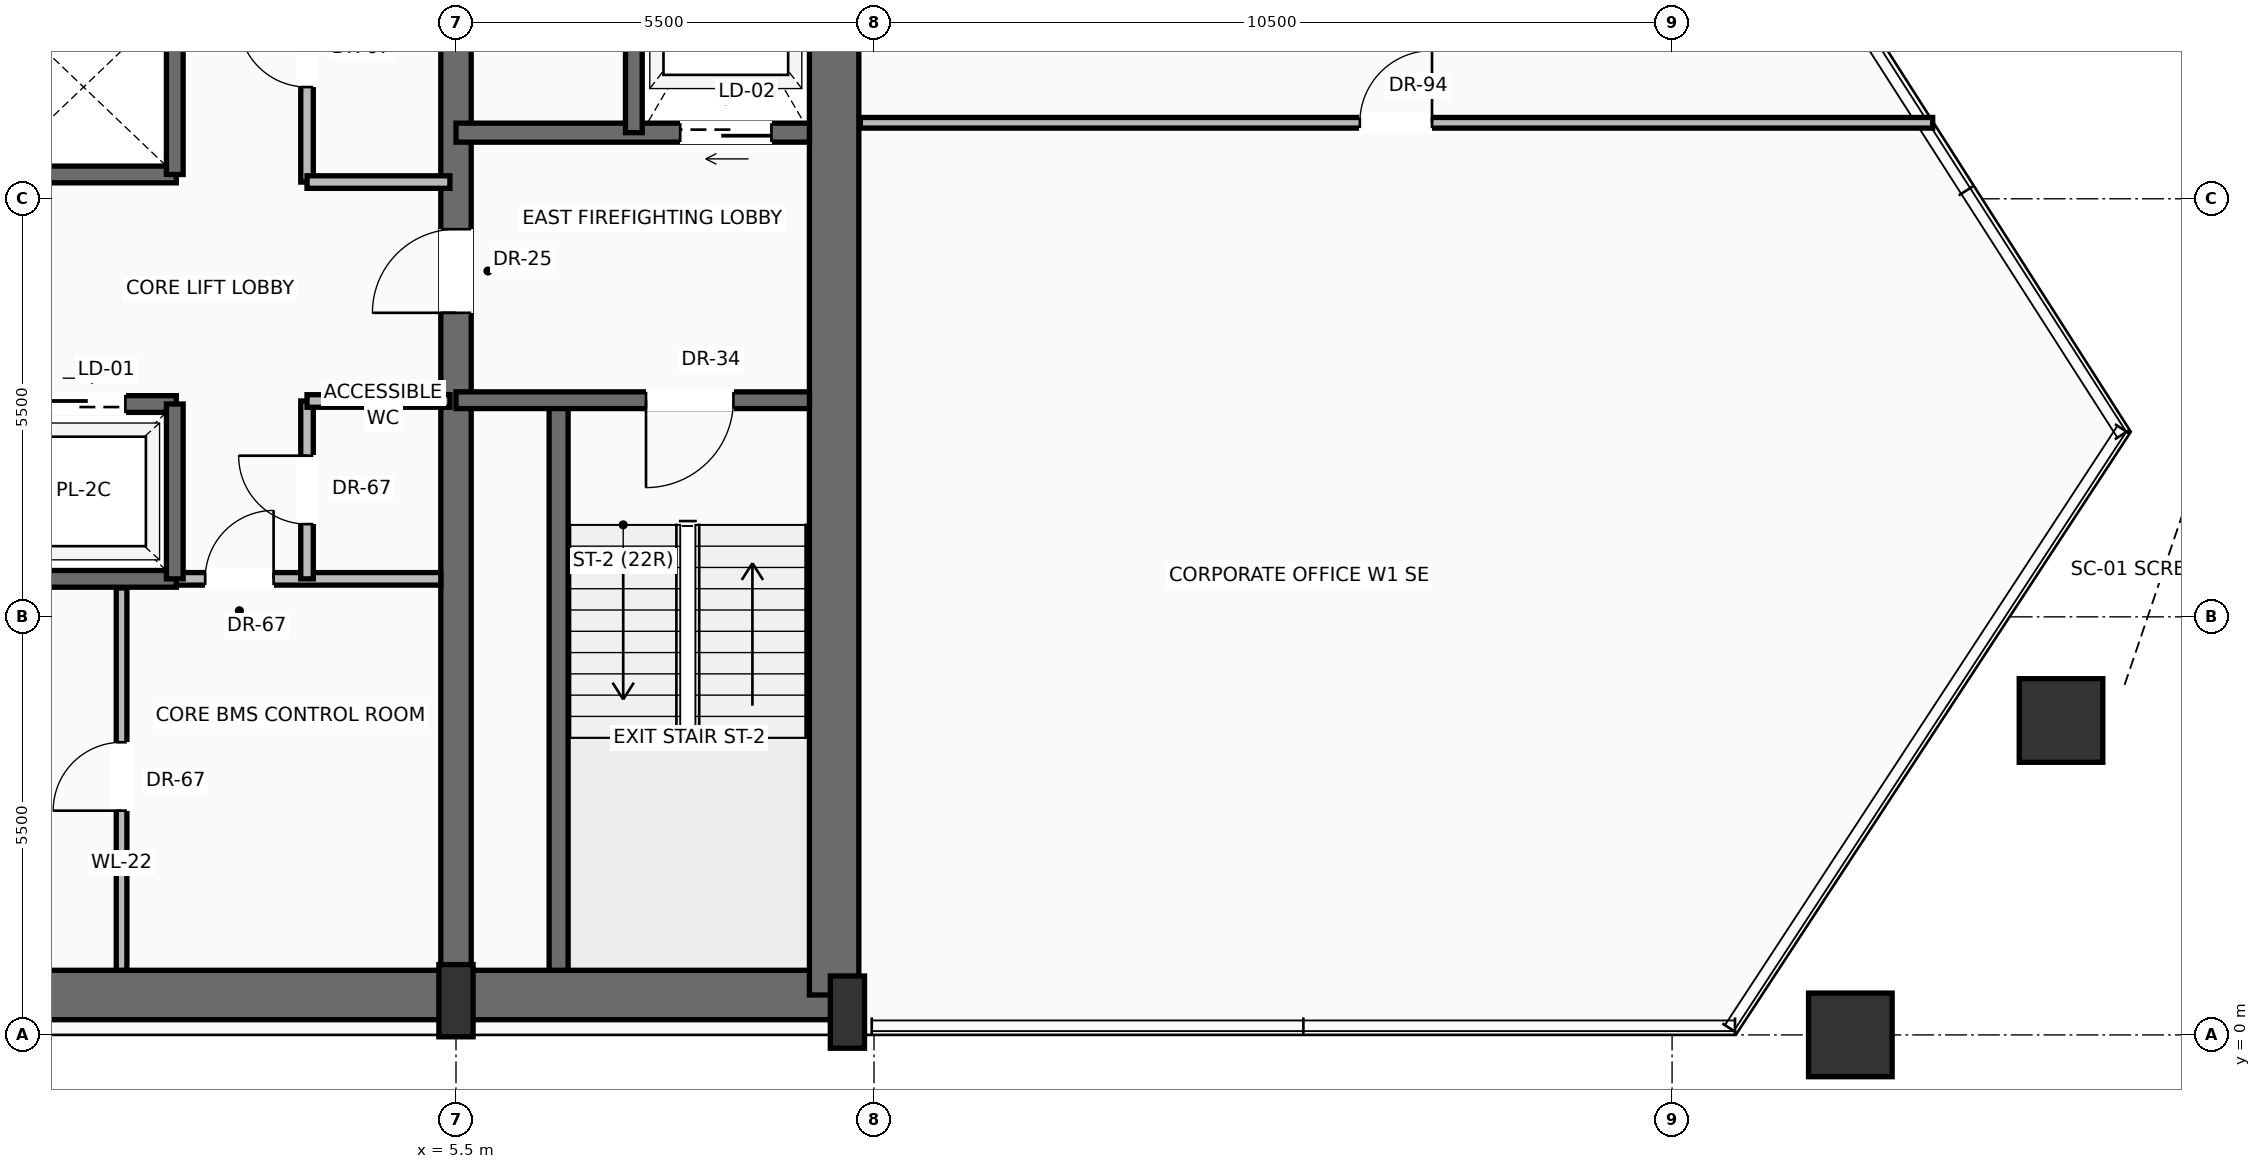
"""IFC4 building model, lengths in metres.
Left out: names, types, materials, properties, quantities, classifications, styles, units other than length and angle.
Written with IfcOpenShell. Run it as: python <this file> out.ifc"""

import sys

from ifc_helpers import new_model, si_unit, direction, frame, frame_2d, origin, origin_2d, place, context, subcontext, project, spatial, rectangle, hollow_rectangle, extrude, source, transform, mapped, element, fill, save


model = new_model("IFC4")
c1 = context("Model", 3, precision=1e-05, world=origin(), true_north=direction((0.0, 1.0)))
c2 = subcontext(c1, "Body", "Model", "MODEL_VIEW")
j1 = project(units=[si_unit("LENGTHUNIT", "METRE"), si_unit("PLANEANGLEUNIT", "RADIAN")], contexts=[c1])
p1 = place(None, origin())
s1 = spatial("IfcSite", under=j1, at=p1, CompositionType="ELEMENT")
p2 = place(p1, origin())
s2 = spatial("IfcBuilding", under=s1, at=p2, CompositionType="ELEMENT")
p3 = place(p2, frame((0.0, 0.0, 133.0)))
s3 = spatial("IfcBuildingStorey", under=s2, at=p3, CompositionType="ELEMENT", Elevation=133.0)
p4 = place(p3, frame((-10.65, 0.525, 0.0), z_axis=(0.0, 0.0, 1.0), x_axis=(1.0, 0.0, 0.0)))
e1 = element("IfcWall", 1, at=p4, inside=s3, PredefinedType="SHEAR", context=c2, shape_type="SweptSolid", body=[
    extrude(rectangle(XDim=21.3, YDim=0.65, at=frame_2d((10.65, 0.0))), origin(), (0.0, 0.0, 1.0), 3.47),
])
p5 = place(p3, frame((10.475, 0.525, 0.0), z_axis=(0.0, 0.0, 1.0), x_axis=(0.0, 1.0, 0.0)))
e2 = element("IfcWall", 2, at=p5, inside=s3, PredefinedType="SHEAR", context=c2, shape_type="SweptSolid", body=[
    extrude(rectangle(XDim=15.55, YDim=0.65, at=frame_2d((7.775, 0.0))), origin(), (0.0, 0.0, 1.0), 3.47),
])
p6 = place(p3, frame((5.5, 0.525, 0.0), z_axis=(0.0, 0.0, 1.0), x_axis=(0.0, 1.0, 0.0)))
e3 = element("IfcWall", 3, at=p6, inside=s3, PredefinedType="SHEAR", context=c2, shape_type="SweptSolid", body=[
    extrude(rectangle(XDim=15.55, YDim=0.4, at=frame_2d((7.775, 0.0))), origin(), (0.0, 0.0, 1.0), 3.47),
])
p7 = place(p6, frame((8.975, 0.0, 0.0)))
e4 = element("IfcOpeningElement", 4, at=p7, cuts=e3, PredefinedType="OPENING", context=c2, shape_type="SweptSolid", body=[
    extrude(rectangle(XDim=1.1, YDim=2.2, at=frame_2d((0.55, 1.1))), frame((0.0, 0.21, 0.0), z_axis=(0.0, -1.0, 0.0), x_axis=(1.0, 0.0, 0.0)), (0.0, 0.0, 1.0), 0.42),
])
m1 = source(origin(), c2, "Body", "SweptSolid", [
    extrude(rectangle(XDim=0.45, YDim=0.95, at=origin_2d()), origin(), (0.0, 0.0, 1.0), 3.7),
])
for number, where, z_axis, x_axis in (
    (5, (5.5, 0.45, 0.0), (0.0, 0.0, 1.0), (1.0, 0.0, 0.0)),
    (6, (10.65, 0.3, 0.0), (0.0, 0.0, 1.0), (1.0, 0.0, 0.0)),
):
    element("IfcColumn", number, at=place(p3, frame(where, z_axis=z_axis, x_axis=x_axis)), inside=s3, PredefinedType="PILASTER", context=c2, shape_type="MappedRepresentation", body=[
        mapped(m1, transform((0.0, 0.0, 0.0), scale=1.0)),
    ])
m2 = source(origin(), c2, "Body", "SweptSolid", [
    extrude(hollow_rectangle(XDim=1.1, YDim=1.1, WallThickness=0.055, at=origin_2d()), origin(), (0.0, 0.0, 1.0), 3.691),
])
p8 = place(p3, frame((23.846, 0.0, 0.004), z_axis=(0.00919334122, 0.0, 0.999957740346), x_axis=(0.0, 1.0, 0.0)))
e7 = element("IfcColumn", 7, at=p8, inside=s3, PredefinedType="COLUMN", context=c2, shape_type="MappedRepresentation", body=[
    mapped(m2, transform((0.0, 0.0, 0.0), scale=1.0)),
])
m3 = source(origin(), c2, "Body", "SweptSolid", [
    extrude(hollow_rectangle(XDim=1.1, YDim=1.1, WallThickness=0.055, at=origin_2d()), origin(), (0.0, 0.0, 1.0), 3.692),
])
p9 = place(p3, frame((26.617, 4.136, 0.004), z_axis=(-0.003372815839, -0.015475272673, 0.999874562157), x_axis=(0.977063170927, -0.212949665458, 0.0)))
e8 = element("IfcColumn", 8, at=p9, inside=s3, PredefinedType="COLUMN", context=c2, shape_type="MappedRepresentation", body=[
    mapped(m3, transform((0.0, 0.0, 0.0), scale=1.0)),
])
p10 = place(p3, frame((6.85, 0.85, 0.0), z_axis=(0.0, 0.0, 1.0), x_axis=(0.0, 1.0, 0.0)))
e9 = element("IfcWall", 9, at=p10, inside=s3, PredefinedType="SOLIDWALL", context=c2, shape_type="SweptSolid", body=[
    extrude(rectangle(XDim=7.5, YDim=0.25, at=frame_2d((3.75, 0.0))), origin(), (0.0, 0.0, 1.0), 3.47),
])
p11 = place(p3, frame((10.15, 8.35, 0.0), z_axis=(0.0, 0.0, 1.0), x_axis=(-1.0, 0.0, 0.0)))
e10 = element("IfcWall", 10, at=p11, inside=s3, PredefinedType="SOLIDWALL", context=c2, shape_type="SweptSolid", body=[
    extrude(rectangle(XDim=4.65, YDim=0.22, at=frame_2d((2.325, 0.0))), origin(), (0.0, 0.0, 1.0), 3.47),
])
p12 = place(p11, frame((1.0, 0.0, 0.0)))
e11 = element("IfcOpeningElement", 11, at=p12, cuts=e10, PredefinedType="OPENING", context=c2, shape_type="SweptSolid", body=[
    extrude(rectangle(XDim=1.15, YDim=2.2, at=frame_2d((0.575, 1.1))), frame((0.0, 0.12, 0.0), z_axis=(0.0, -1.0, 0.0), x_axis=(1.0, 0.0, 0.0)), (0.0, 0.0, 1.0), 0.24),
])
p13 = place(p3, frame((10.15, 11.87, 0.0), z_axis=(0.0, 0.0, 1.0), x_axis=(-1.0, 0.0, 0.0)))
e12 = element("IfcWall", 12, at=p13, inside=s3, PredefinedType="SOLIDWALL", context=c2, shape_type="SweptSolid", body=[
    extrude(rectangle(XDim=4.65, YDim=0.25, at=frame_2d((2.325, 0.0))), origin(), (0.0, 0.0, 1.0), 3.47),
])
p14 = place(p13, frame((0.5, 0.0, 0.0)))
e13 = element("IfcOpeningElement", 13, at=p14, cuts=e12, PredefinedType="OPENING", context=c2, shape_type="SweptSolid", body=[
    extrude(rectangle(XDim=1.2, YDim=2.25, at=frame_2d((0.6, 1.125))), frame((0.0, 0.135, 0.0), z_axis=(0.0, -1.0, 0.0), x_axis=(1.0, 0.0, 0.0)), (0.0, 0.0, 1.0), 0.27),
])
p15 = place(p3, frame((7.84, 11.87, 0.0), z_axis=(0.0, 0.0, 1.0), x_axis=(0.0, 1.0, 0.0)))
e14 = element("IfcWall", 14, at=p15, inside=s3, PredefinedType="SOLIDWALL", context=c2, shape_type="SweptSolid", body=[
    extrude(rectangle(XDim=3.88, YDim=0.22, at=frame_2d((1.94, 0.0))), origin(), (0.0, 0.0, 1.0), 3.47),
])
p16 = place(p3, frame((1.82, 6.0, 0.0), z_axis=(0.0, 0.0, 1.0), x_axis=(1.0, 0.0, 0.0)))
e15 = element("IfcWall", 15, at=p16, inside=s3, PredefinedType="PARTITIONING", context=c2, shape_type="SweptSolid", body=[
    extrude(rectangle(XDim=3.48, YDim=0.165, at=frame_2d((1.74, 0.0))), origin(), (0.0, 0.0, 1.0), 3.462),
])
p17 = place(p16, frame((0.38, 0.0, 0.0)))
e16 = element("IfcOpeningElement", 16, at=p17, cuts=e15, PredefinedType="OPENING", context=c2, shape_type="SweptSolid", body=[
    extrude(rectangle(XDim=0.9, YDim=2.1, at=frame_2d((0.45, 1.05))), frame((0.0, 0.093, 0.0), z_axis=(0.0, -1.0, 0.0), x_axis=(1.0, 0.0, 0.0)), (0.0, 0.0, 1.0), 0.185),
])
p18 = place(p3, frame((1.1, 0.85, 0.0), z_axis=(0.0, 0.0, 1.0), x_axis=(0.0, 1.0, 0.0)))
e17 = element("IfcWall", 17, at=p18, inside=s3, PredefinedType="PARTITIONING", context=c2, shape_type="SweptSolid", body=[
    extrude(rectangle(XDim=5.03, YDim=0.14, at=frame_2d((2.515, 0.0))), origin(), (0.0, 0.0, 1.0), 3.462),
])
p19 = place(p18, frame((2.1, 0.0, 0.0)))
e18 = element("IfcOpeningElement", 18, at=p19, cuts=e17, PredefinedType="OPENING", context=c2, shape_type="SweptSolid", body=[
    extrude(rectangle(XDim=0.9, YDim=2.1, at=frame_2d((0.45, 1.05))), frame((0.0, 0.08, 0.0), z_axis=(0.0, -1.0, 0.0), x_axis=(1.0, 0.0, 0.0)), (0.0, 0.0, 1.0), 0.16),
])
p20 = place(p3, frame((3.54, 6.0, 0.0), z_axis=(0.0, 0.0, 1.0), x_axis=(0.0, 1.0, 0.0)))
e19 = element("IfcWall", 19, at=p20, inside=s3, PredefinedType="PARTITIONING", context=c2, shape_type="SweptSolid", body=[
    extrude(rectangle(XDim=2.34, YDim=0.165, at=frame_2d((1.17, 0.0))), origin(), (0.0, 0.0, 1.0), 3.462),
])
p21 = place(p20, frame((0.72, 0.0, 0.0)))
e20 = element("IfcOpeningElement", 20, at=p21, cuts=e19, PredefinedType="OPENING", context=c2, shape_type="SweptSolid", body=[
    extrude(rectangle(XDim=0.9, YDim=2.1, at=frame_2d((0.45, 1.05))), frame((0.0, 0.093, 0.0), z_axis=(0.0, -1.0, 0.0), x_axis=(1.0, 0.0, 0.0)), (0.0, 0.0, 1.0), 0.185),
])
p22 = place(p3, frame((3.54, 8.34, 0.0), z_axis=(0.0, 0.0, 1.0), x_axis=(1.0, 0.0, 0.0)))
e21 = element("IfcWall", 21, at=p22, inside=s3, PredefinedType="PARTITIONING", context=c2, shape_type="SweptSolid", body=[
    extrude(rectangle(XDim=1.88, YDim=0.165, at=frame_2d((0.94, 0.0))), origin(), (0.0, 0.0, 1.0), 3.462),
])
p23 = place(p3, frame((-5.5, 6.0, 0.0), z_axis=(0.0, 0.0, 1.0), x_axis=(1.0, 0.0, 0.0)))
e22 = element("IfcWall", 22, at=p23, inside=s3, PredefinedType="SOLIDWALL", context=c2, shape_type="SweptSolid", body=[
    extrude(rectangle(XDim=7.32, YDim=0.22, at=frame_2d((3.66, 0.0))), origin(), (0.0, 0.0, 1.0), 3.47),
])
p24 = place(p3, frame((-5.5, 8.3, 0.0), z_axis=(0.0, 0.0, 1.0), x_axis=(1.0, 0.0, 0.0)))
e23 = element("IfcWall", 23, at=p24, inside=s3, PredefinedType="SOLIDWALL", context=c2, shape_type="SweptSolid", body=[
    extrude(rectangle(XDim=7.32, YDim=0.22, at=frame_2d((3.66, 0.0))), origin(), (0.0, 0.0, 1.0), 3.47),
])
p25 = place(p24, frame((0.75, 0.0, 0.0)))
e24 = element("IfcOpeningElement", 24, at=p25, cuts=e23, PredefinedType="OPENING", context=c2, shape_type="SweptSolid", body=[
    extrude(rectangle(XDim=1.1, YDim=2.2, at=frame_2d((0.55, 1.1))), frame((0.0, 0.12, 0.0), z_axis=(0.0, -1.0, 0.0), x_axis=(1.0, 0.0, 0.0)), (0.0, 0.0, 1.0), 0.24),
])
p26 = place(p24, frame((3.15, 0.0, 0.0)))
e25 = element("IfcOpeningElement", 25, at=p26, cuts=e23, PredefinedType="OPENING", context=c2, shape_type="SweptSolid", body=[
    extrude(rectangle(XDim=1.1, YDim=2.2, at=frame_2d((0.55, 1.1))), frame((0.0, 0.12, 0.0), z_axis=(0.0, -1.0, 0.0), x_axis=(1.0, 0.0, 0.0)), (0.0, 0.0, 1.0), 0.24),
])
p27 = place(p24, frame((5.55, 0.0, 0.0)))
e26 = element("IfcOpeningElement", 26, at=p27, cuts=e23, PredefinedType="OPENING", context=c2, shape_type="SweptSolid", body=[
    extrude(rectangle(XDim=1.1, YDim=2.2, at=frame_2d((0.55, 1.1))), frame((0.0, 0.12, 0.0), z_axis=(0.0, -1.0, 0.0), x_axis=(1.0, 0.0, 0.0)), (0.0, 0.0, 1.0), 0.24),
])
p28 = place(p3, frame((1.8, 6.0, 0.0), z_axis=(0.0, 0.0, 1.0), x_axis=(0.0, 1.0, 0.0)))
e27 = element("IfcWall", 27, at=p28, inside=s3, PredefinedType="SOLIDWALL", context=c2, shape_type="SweptSolid", body=[
    extrude(rectangle(XDim=2.3, YDim=0.22, at=frame_2d((1.15, 0.0))), origin(), (0.0, 0.0, 1.0), 3.47),
])
p29 = place(p3, frame((-5.5, 11.32, 0.0), z_axis=(0.0, 0.0, 1.0), x_axis=(1.0, 0.0, 0.0)))
e28 = element("IfcWall", 28, at=p29, inside=s3, PredefinedType="SOLIDWALL", context=c2, shape_type="SweptSolid", body=[
    extrude(rectangle(XDim=7.32, YDim=0.22, at=frame_2d((3.66, 0.0))), origin(), (0.0, 0.0, 1.0), 3.47),
])
p30 = place(p3, frame((1.8, 11.32, 0.0), z_axis=(0.0, 0.0, 1.0), x_axis=(0.0, 1.0, 0.0)))
e29 = element("IfcWall", 29, at=p30, inside=s3, PredefinedType="SOLIDWALL", context=c2, shape_type="SweptSolid", body=[
    extrude(rectangle(XDim=2.3, YDim=0.22, at=frame_2d((1.15, 0.0))), origin(), (0.0, 0.0, 1.0), 3.47),
])
p31 = place(p3, frame((3.54, 11.22, 0.0), z_axis=(0.0, 0.0, 1.0), x_axis=(0.0, 1.0, 0.0)))
e30 = element("IfcWall", 30, at=p31, inside=s3, PredefinedType="PARTITIONING", context=c2, shape_type="SweptSolid", body=[
    extrude(rectangle(XDim=4.53, YDim=0.165, at=frame_2d((2.265, 0.0))), origin(), (0.0, 0.0, 1.0), 3.462),
])
p32 = place(p31, frame((1.25, 0.0, 0.0)))
e31 = element("IfcOpeningElement", 31, at=p32, cuts=e30, PredefinedType="OPENING", context=c2, shape_type="SweptSolid", body=[
    extrude(rectangle(XDim=0.9, YDim=2.1, at=frame_2d((0.45, 1.05))), frame((0.0, 0.093, 0.0), z_axis=(0.0, -1.0, 0.0), x_axis=(1.0, 0.0, 0.0)), (0.0, 0.0, 1.0), 0.185),
])
p33 = place(p3, frame((3.54, 11.22, 0.0), z_axis=(0.0, 0.0, 1.0), x_axis=(1.0, 0.0, 0.0)))
e32 = element("IfcWall", 32, at=p33, inside=s3, PredefinedType="PARTITIONING", context=c2, shape_type="SweptSolid", body=[
    extrude(rectangle(XDim=1.88, YDim=0.165, at=frame_2d((0.94, 0.0))), origin(), (0.0, 0.0, 1.0), 3.462),
])
p34 = place(p3, frame((10.82, 12.0, 0.0), z_axis=(0.0, 0.0, 1.0), x_axis=(1.0, 0.0, 0.0)))
e33 = element("IfcWall", 33, at=p34, inside=s3, PredefinedType="PARTITIONING", context=c2, shape_type="SweptSolid", body=[
    extrude(rectangle(XDim=14.109, YDim=0.14, at=frame_2d((7.055, 0.0))), origin(), (0.0, 0.0, 1.0), 3.462),
])
p35 = place(p34, frame((6.572, 0.0, 0.0)))
e34 = element("IfcOpeningElement", 34, at=p35, cuts=e33, PredefinedType="OPENING", context=c2, shape_type="SweptSolid", body=[
    extrude(rectangle(XDim=0.95, YDim=2.2, at=frame_2d((0.475, 1.1))), frame((0.0, 0.08, 0.0), z_axis=(0.0, -1.0, 0.0), x_axis=(1.0, 0.0, 0.0)), (0.0, 0.0, 1.0), 0.16),
])
m4 = source(origin(), c2, "Body", "SweptSolid", [
    extrude(rectangle(XDim=1.15, YDim=2.2, at=frame_2d((0.575, 1.1))), frame((0.0, 0.025, 0.0), z_axis=(0.0, -1.0, 0.0), x_axis=(1.0, 0.0, 0.0)), (0.0, 0.0, 1.0), 0.05),
])
p36 = place(p12, origin())
e35 = element("IfcDoor", 35, at=p36, inside=s3, OperationType="SINGLE_SWING_RIGHT", PredefinedType="DOOR", context=c2, shape_type="MappedRepresentation", body=[
    mapped(m4, transform((0.0, 0.0, 0.0), scale=1.0)),
])
fill(e11, e35)
m5 = source(origin(), c2, "Body", "SweptSolid", [
    extrude(rectangle(XDim=1.1, YDim=2.2, at=frame_2d((0.55, 1.1))), frame((0.0, 0.025, 0.0), z_axis=(0.0, -1.0, 0.0), x_axis=(1.0, 0.0, 0.0)), (0.0, 0.0, 1.0), 0.05),
])
p37 = place(p7, origin())
e36 = element("IfcDoor", 36, at=p37, inside=s3, OperationType="SINGLE_SWING_LEFT", PredefinedType="DOOR", context=c2, shape_type="MappedRepresentation", body=[
    mapped(m5, transform((0.0, 0.0, 0.0), scale=1.0)),
])
fill(e4, e36)
m6 = source(origin(), c2, "Body", "SweptSolid", [
    extrude(rectangle(XDim=1.2, YDim=2.25, at=frame_2d((0.6, 1.125))), frame((0.0, 0.025, 0.0), z_axis=(0.0, -1.0, 0.0), x_axis=(1.0, 0.0, 0.0)), (0.0, 0.0, 1.0), 0.05),
])
p38 = place(p14, origin())
e37 = element("IfcDoor", 37, at=p38, inside=s3, OperationType="SLIDING_TO_RIGHT", PredefinedType="DOOR", context=c2, shape_type="MappedRepresentation", body=[
    mapped(m6, transform((0.0, 0.0, 0.0), scale=1.0)),
])
fill(e13, e37)
m7 = source(origin(), c2, "Body", "SweptSolid", [
    extrude(rectangle(XDim=0.9, YDim=2.1, at=frame_2d((0.45, 1.05))), frame((0.0, 0.025, 0.0), z_axis=(0.0, -1.0, 0.0), x_axis=(1.0, 0.0, 0.0)), (0.0, 0.0, 1.0), 0.05),
])
p39 = place(p17, origin())
e38 = element("IfcDoor", 38, at=p39, inside=s3, OperationType="SINGLE_SWING_RIGHT", PredefinedType="DOOR", context=c2, shape_type="MappedRepresentation", body=[
    mapped(m7, transform((0.0, 0.0, 0.0), scale=1.0)),
])
fill(e16, e38)
p40 = place(p19, origin())
e39 = element("IfcDoor", 39, at=p40, inside=s3, OperationType="SINGLE_SWING_LEFT", PredefinedType="DOOR", context=c2, shape_type="MappedRepresentation", body=[
    mapped(m7, transform((0.0, 0.0, 0.0), scale=1.0)),
])
fill(e18, e39)
p41 = place(p21, origin())
e40 = element("IfcDoor", 40, at=p41, inside=s3, OperationType="SINGLE_SWING_RIGHT", PredefinedType="DOOR", context=c2, shape_type="MappedRepresentation", body=[
    mapped(m7, transform((0.0, 0.0, 0.0), scale=1.0)),
])
fill(e20, e40)
m8 = source(origin(), c2, "Body", "SweptSolid", [
    extrude(rectangle(XDim=1.1, YDim=2.2, at=frame_2d((0.55, 1.1))), frame((0.0, 0.025, 0.0), z_axis=(0.0, -1.0, 0.0), x_axis=(1.0, 0.0, 0.0)), (0.0, 0.0, 1.0), 0.05),
])
p42 = place(p27, origin())
e41 = element("IfcDoor", 41, at=p42, inside=s3, OperationType="SLIDING_TO_LEFT", PredefinedType="DOOR", context=c2, shape_type="MappedRepresentation", body=[
    mapped(m8, transform((0.0, 0.0, 0.0), scale=1.0)),
])
fill(e26, e41)
p43 = place(p32, origin())
e42 = element("IfcDoor", 42, at=p43, inside=s3, OperationType="SINGLE_SWING_RIGHT", PredefinedType="DOOR", context=c2, shape_type="MappedRepresentation", body=[
    mapped(m7, transform((0.0, 0.0, 0.0), scale=1.0)),
])
fill(e31, e42)
m9 = source(origin(), c2, "Body", "SweptSolid", [
    extrude(rectangle(XDim=0.95, YDim=2.2, at=frame_2d((0.475, 1.1))), frame((0.0, 0.025, 0.0), z_axis=(0.0, -1.0, 0.0), x_axis=(1.0, 0.0, 0.0)), (0.0, 0.0, 1.0), 0.05),
])
p44 = place(p35, origin())
e43 = element("IfcDoor", 43, at=p44, inside=s3, OperationType="SINGLE_SWING_RIGHT", PredefinedType="DOOR", context=c2, shape_type="MappedRepresentation", body=[
    mapped(m9, transform((0.0, 0.0, 0.0), scale=1.0)),
])
fill(e34, e43)
save(model, sys.argv[1])
